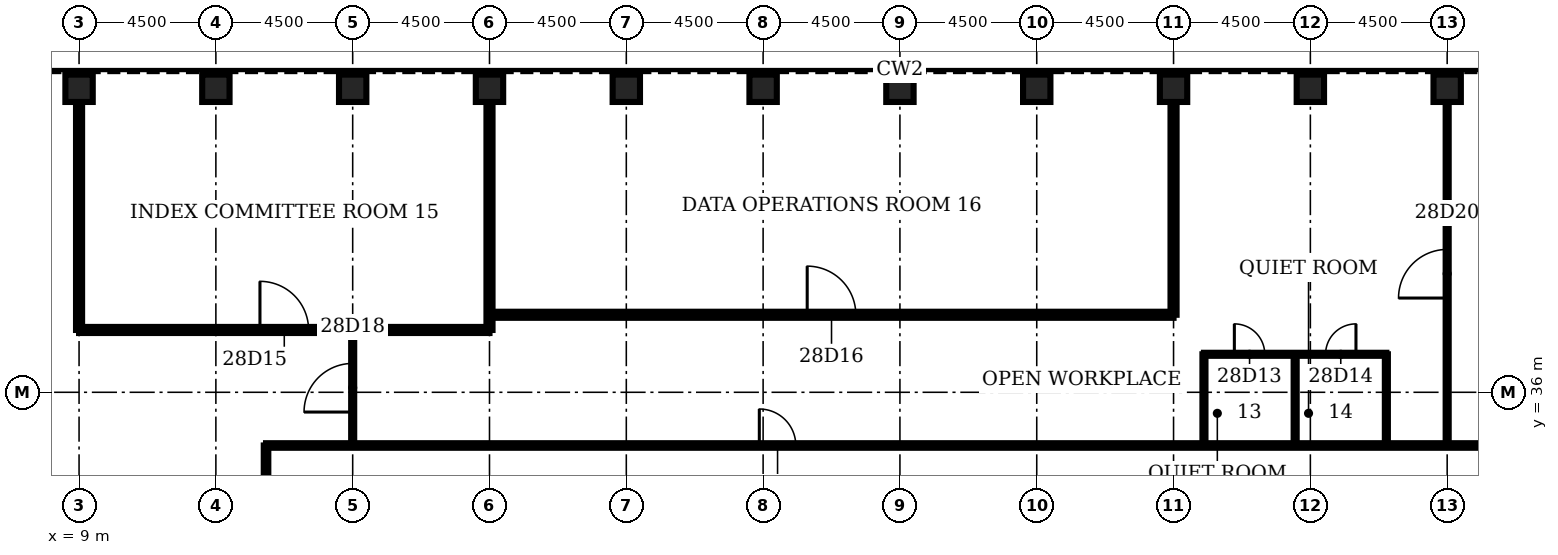
"""IFC4 building model, lengths in metres.
Left out: names, types, materials, properties, quantities, classifications, styles, units other than length and angle.
Written with IfcOpenShell. Run it as: python <this file> out.ifc"""

import sys

from ifc_helpers import new_model, si_unit, direction, frame, frame_2d, origin, origin_2d, place, context, subcontext, project, spatial, rectangle, hollow_rectangle, extrude, element, fill, save


model = new_model("IFC4")
c1 = context("Model", 3, precision=1e-05, world=origin(), true_north=direction((0.0, 1.0)))
c2 = subcontext(c1, "Body", "Model", "MODEL_VIEW")
j1 = project(units=[si_unit("LENGTHUNIT", "METRE"), si_unit("PLANEANGLEUNIT", "RADIAN")], contexts=[c1])
p1 = place(None, origin())
s1 = spatial("IfcSite", under=j1, at=p1, CompositionType="ELEMENT")
p2 = place(p1, origin())
s2 = spatial("IfcBuilding", under=s1, at=p2, CompositionType="ELEMENT")
p3 = place(p2, frame((0.0, 0.0, 129.9)))
s3 = spatial("IfcBuildingStorey", under=s2, at=p3, CompositionType="ELEMENT", Elevation=129.9)
for number, where, z_axis, x_axis in (
    (1, (54.0, 46.0, 0.0), (0.0, 0.0, 1.0), (0.0, 1.0, 0.0)),
    (2, (49.5, 46.0, 0.0), (0.0, 0.0, 1.0), (0.0, 1.0, 0.0)),
    (3, (45.0, 46.0, 0.0), (0.0, 0.0, 1.0), (0.0, 1.0, 0.0)),
    (4, (40.5, 46.0, 0.0), (0.0, 0.0, 1.0), (0.0, 1.0, 0.0)),
    (5, (36.0, 46.0, 0.0), (0.0, 0.0, 1.0), (0.0, 1.0, 0.0)),
    (6, (31.5, 46.0, 0.0), (0.0, 0.0, 1.0), (0.0, 1.0, 0.0)),
    (7, (27.0, 46.0, 0.0), (0.0, 0.0, 1.0), (0.0, 1.0, 0.0)),
    (8, (22.5, 46.0, 0.0), (0.0, 0.0, 1.0), (0.0, 1.0, 0.0)),
    (9, (18.0, 46.0, 0.0), (0.0, 0.0, 1.0), (0.0, 1.0, 0.0)),
    (10, (13.5, 46.0, 0.0), (0.0, 0.0, 1.0), (0.0, 1.0, 0.0)),
    (11, (9.0, 46.0, 0.0), (0.0, 0.0, 1.0), (0.0, 1.0, 0.0)),
):
    element("IfcColumn", number, at=place(p3, frame(where, z_axis=z_axis, x_axis=x_axis)), inside=s3, PredefinedType="COLUMN", context=c2, shape_type="SweptSolid", body=[
        extrude(hollow_rectangle(XDim=0.9, YDim=0.9, WallThickness=0.1, at=origin_2d()), origin(), (0.0, 0.0, 1.0), 4.2),
    ])
p4 = place(p3, frame((15.15, 34.25, 0.0), z_axis=(0.0, 0.0, 1.0), x_axis=(1.0, 0.0, 0.0)))
e12 = element("IfcWall", 12, at=p4, inside=s3, PredefinedType="PARTITIONING", context=c2, shape_type="SweptSolid", body=[
    extrude(rectangle(XDim=41.7, YDim=0.15, at=frame_2d((20.85, 0.0))), origin(), (0.0, 0.0, 1.0), 3.0),
])
p5 = place(p4, frame((16.225, 0.0, 0.0)))
e13 = element("IfcOpeningElement", 13, at=p5, cuts=e12, PredefinedType="OPENING", context=c2, shape_type="SweptSolid", body=[
    extrude(rectangle(XDim=1.2, YDim=2.1, at=frame_2d((0.6, 1.05))), frame((0.0, 0.085, 0.0), z_axis=(0.0, -1.0, 0.0), x_axis=(1.0, 0.0, 0.0)), (0.0, 0.0, 1.0), 0.17),
])
p6 = place(p3, frame((46.0, 37.25, 0.0), z_axis=(0.0, 0.0, 1.0), x_axis=(1.0, 0.0, 0.0)))
e14 = element("IfcWall", 14, at=p6, inside=s3, PredefinedType="PARTITIONING", context=c2, shape_type="SweptSolid", body=[
    extrude(rectangle(XDim=6.0, YDim=0.1, at=frame_2d((3.0, 0.0))), origin(), (0.0, 0.0, 1.0), 3.0),
])
p7 = place(p6, frame((1.0, 0.0, 0.0)))
e15 = element("IfcOpeningElement", 15, at=p7, cuts=e14, PredefinedType="OPENING", context=c2, shape_type="SweptSolid", body=[
    extrude(rectangle(XDim=1.0, YDim=2.1, at=frame_2d((0.5, 1.05))), frame((0.0, 0.06, 0.0), z_axis=(0.0, -1.0, 0.0), x_axis=(1.0, 0.0, 0.0)), (0.0, 0.0, 1.0), 0.12),
])
p8 = place(p6, frame((4.0, 0.0, 0.0)))
e16 = element("IfcOpeningElement", 16, at=p8, cuts=e14, PredefinedType="OPENING", context=c2, shape_type="SweptSolid", body=[
    extrude(rectangle(XDim=1.0, YDim=2.1, at=frame_2d((0.5, 1.05))), frame((0.0, 0.06, 0.0), z_axis=(0.0, -1.0, 0.0), x_axis=(1.0, 0.0, 0.0)), (0.0, 0.0, 1.0), 0.12),
])
p9 = place(p3, frame((9.0, 38.05, 0.0), z_axis=(0.0, 0.0, 1.0), x_axis=(1.0, 0.0, 0.0)))
e17 = element("IfcWall", 17, at=p9, inside=s3, PredefinedType="PARTITIONING", context=c2, shape_type="SweptSolid", body=[
    extrude(rectangle(XDim=13.5, YDim=0.2, at=frame_2d((6.75, 0.0))), origin(), (0.0, 0.0, 1.0), 3.0),
])
p10 = place(p9, frame((5.95, 0.0, 0.0)))
e18 = element("IfcOpeningElement", 18, at=p10, cuts=e17, PredefinedType="OPENING", context=c2, shape_type="SweptSolid", body=[
    extrude(rectangle(XDim=1.6, YDim=2.1, at=frame_2d((0.8, 1.05))), frame((0.0, 0.11, 0.0), z_axis=(0.0, -1.0, 0.0), x_axis=(1.0, 0.0, 0.0)), (0.0, 0.0, 1.0), 0.22),
])
p11 = place(p3, frame((22.5, 38.55, 0.0), z_axis=(0.0, 0.0, 1.0), x_axis=(1.0, 0.0, 0.0)))
e19 = element("IfcWall", 19, at=p11, inside=s3, PredefinedType="PARTITIONING", context=c2, shape_type="SweptSolid", body=[
    extrude(rectangle(XDim=22.5, YDim=0.2, at=frame_2d((11.25, 0.0))), origin(), (0.0, 0.0, 1.0), 3.0),
])
p12 = place(p11, frame((10.45, 0.0, 0.0)))
e20 = element("IfcOpeningElement", 20, at=p12, cuts=e19, PredefinedType="OPENING", context=c2, shape_type="SweptSolid", body=[
    extrude(rectangle(XDim=1.6, YDim=2.1, at=frame_2d((0.8, 1.05))), frame((0.0, 0.11, 0.0), z_axis=(0.0, -1.0, 0.0), x_axis=(1.0, 0.0, 0.0)), (0.0, 0.0, 1.0), 0.22),
])
p13 = place(p3, frame((9.0, 38.05, 0.0), z_axis=(0.0, 0.0, 1.0), x_axis=(0.0, 1.0, 0.0)))
e21 = element("IfcWall", 21, at=p13, inside=s3, PredefinedType="PARTITIONING", context=c2, shape_type="SweptSolid", body=[
    extrude(rectangle(XDim=7.5, YDim=0.2, at=frame_2d((3.75, 0.0))), origin(), (0.0, 0.0, 1.0), 3.0),
])
p14 = place(p3, frame((15.15, 13.75, 0.0), z_axis=(0.0, 0.0, 1.0), x_axis=(0.0, 1.0, 0.0)))
e22 = element("IfcWall", 22, at=p14, inside=s3, PredefinedType="PARTITIONING", context=c2, shape_type="SweptSolid", body=[
    extrude(rectangle(XDim=20.5, YDim=0.15, at=frame_2d((10.25, 0.0))), origin(), (0.0, 0.0, 1.0), 3.0),
])
p15 = place(p14, frame((9.65, 0.0, 0.0)))
e23 = element("IfcOpeningElement", 23, at=p15, cuts=e22, PredefinedType="OPENING", context=c2, shape_type="SweptSolid", body=[
    extrude(rectangle(XDim=1.2, YDim=2.1, at=frame_2d((0.6, 1.05))), frame((0.0, 0.085, 0.0), z_axis=(0.0, -1.0, 0.0), x_axis=(1.0, 0.0, 0.0)), (0.0, 0.0, 1.0), 0.17),
])
p16 = place(p3, frame((18.0, 34.25, 0.0), z_axis=(0.0, 0.0, 1.0), x_axis=(0.0, 1.0, 0.0)))
e24 = element("IfcWall", 24, at=p16, inside=s3, PredefinedType="PARTITIONING", context=c2, shape_type="SweptSolid", body=[
    extrude(rectangle(XDim=3.8, YDim=0.1, at=frame_2d((1.9, 0.0))), origin(), (0.0, 0.0, 1.0), 3.0),
])
p17 = place(p16, frame((1.1, 0.0, 0.0)))
e25 = element("IfcOpeningElement", 25, at=p17, cuts=e24, PredefinedType="OPENING", context=c2, shape_type="SweptSolid", body=[
    extrude(rectangle(XDim=1.6, YDim=2.1, at=frame_2d((0.8, 1.05))), frame((0.0, 0.06, 0.0), z_axis=(0.0, -1.0, 0.0), x_axis=(1.0, 0.0, 0.0)), (0.0, 0.0, 1.0), 0.12),
])
p18 = place(p3, frame((22.5, 38.05, 0.0), z_axis=(0.0, 0.0, 1.0), x_axis=(0.0, 1.0, 0.0)))
e26 = element("IfcWall", 26, at=p18, inside=s3, PredefinedType="PARTITIONING", context=c2, shape_type="SweptSolid", body=[
    extrude(rectangle(XDim=7.5, YDim=0.2, at=frame_2d((3.75, 0.0))), origin(), (0.0, 0.0, 1.0), 3.0),
])
p19 = place(p3, frame((45.0, 38.55, 0.0), z_axis=(0.0, 0.0, 1.0), x_axis=(0.0, 1.0, 0.0)))
e27 = element("IfcWall", 27, at=p19, inside=s3, PredefinedType="PARTITIONING", context=c2, shape_type="SweptSolid", body=[
    extrude(rectangle(XDim=7.0, YDim=0.2, at=frame_2d((3.5, 0.0))), origin(), (0.0, 0.0, 1.0), 3.0),
])
for number, where, z_axis, x_axis in (
    (28, (46.0, 34.25, 0.0), (0.0, 0.0, 1.0), (0.0, 1.0, 0.0)),
    (29, (49.0, 34.25, 0.0), (0.0, 0.0, 1.0), (0.0, 1.0, 0.0)),
    (30, (52.0, 34.25, 0.0), (0.0, 0.0, 1.0), (0.0, 1.0, 0.0)),
):
    element("IfcWall", number, at=place(p3, frame(where, z_axis=z_axis, x_axis=x_axis)), inside=s3, PredefinedType="PARTITIONING", context=c2, shape_type="SweptSolid", body=[
        extrude(rectangle(XDim=3.0, YDim=0.1, at=frame_2d((1.5, 0.0))), origin(), (0.0, 0.0, 1.0), 3.0),
    ])
p20 = place(p3, frame((54.0, 34.25, 0.0), z_axis=(0.0, 0.0, 1.0), x_axis=(0.0, 1.0, 0.0)))
e31 = element("IfcWall", 31, at=p20, inside=s3, PredefinedType="PARTITIONING", context=c2, shape_type="SweptSolid", body=[
    extrude(rectangle(XDim=11.3, YDim=0.1, at=frame_2d((5.65, 0.0))), origin(), (0.0, 0.0, 1.0), 3.0),
])
p21 = place(p20, frame((4.85, 0.0, 0.0)))
e32 = element("IfcOpeningElement", 32, at=p21, cuts=e31, PredefinedType="OPENING", context=c2, shape_type="SweptSolid", body=[
    extrude(rectangle(XDim=1.6, YDim=2.1, at=frame_2d((0.8, 1.05))), frame((0.0, 0.06, 0.0), z_axis=(0.0, -1.0, 0.0), x_axis=(1.0, 0.0, 0.0)), (0.0, 0.0, 1.0), 0.12),
])
p22 = place(p7, origin())
e33 = element("IfcDoor", 33, at=p22, inside=s3, OperationType="SINGLE_SWING_LEFT", PredefinedType="DOOR", context=c2, shape_type="SweptSolid", body=[
    extrude(rectangle(XDim=1.0, YDim=2.1, at=frame_2d((0.5, 1.05))), frame((0.0, 0.025, 0.0), z_axis=(0.0, -1.0, 0.0), x_axis=(1.0, 0.0, 0.0)), (0.0, 0.0, 1.0), 0.05),
])
fill(e15, e33)
p23 = place(p8, origin())
e34 = element("IfcDoor", 34, at=p23, inside=s3, OperationType="SINGLE_SWING_RIGHT", PredefinedType="DOOR", context=c2, shape_type="SweptSolid", body=[
    extrude(rectangle(XDim=1.0, YDim=2.1, at=frame_2d((0.5, 1.05))), frame((0.0, 0.025, 0.0), z_axis=(0.0, -1.0, 0.0), x_axis=(1.0, 0.0, 0.0)), (0.0, 0.0, 1.0), 0.05),
])
fill(e16, e34)
p24 = place(p10, origin())
e35 = element("IfcDoor", 35, at=p24, inside=s3, OperationType="SINGLE_SWING_LEFT", PredefinedType="DOOR", context=c2, shape_type="SweptSolid", body=[
    extrude(rectangle(XDim=1.6, YDim=2.1, at=frame_2d((0.8, 1.05))), frame((0.0, 0.025, 0.0), z_axis=(0.0, -1.0, 0.0), x_axis=(1.0, 0.0, 0.0)), (0.0, 0.0, 1.0), 0.05),
])
fill(e18, e35)
p25 = place(p12, origin())
e36 = element("IfcDoor", 36, at=p25, inside=s3, OperationType="SINGLE_SWING_LEFT", PredefinedType="DOOR", context=c2, shape_type="SweptSolid", body=[
    extrude(rectangle(XDim=1.6, YDim=2.1, at=frame_2d((0.8, 1.05))), frame((0.0, 0.025, 0.0), z_axis=(0.0, -1.0, 0.0), x_axis=(1.0, 0.0, 0.0)), (0.0, 0.0, 1.0), 0.05),
])
fill(e20, e36)
p26 = place(p17, origin())
e37 = element("IfcDoor", 37, at=p26, inside=s3, OperationType="SINGLE_SWING_LEFT", PredefinedType="DOOR", context=c2, shape_type="SweptSolid", body=[
    extrude(rectangle(XDim=1.6, YDim=2.1, at=frame_2d((0.8, 1.05))), frame((0.0, 0.025, 0.0), z_axis=(0.0, -1.0, 0.0), x_axis=(1.0, 0.0, 0.0)), (0.0, 0.0, 1.0), 0.05),
])
fill(e25, e37)
p27 = place(p21, origin())
e38 = element("IfcDoor", 38, at=p27, inside=s3, OperationType="SINGLE_SWING_LEFT", PredefinedType="DOOR", context=c2, shape_type="SweptSolid", body=[
    extrude(rectangle(XDim=1.6, YDim=2.1, at=frame_2d((0.8, 1.05))), frame((0.0, 0.025, 0.0), z_axis=(0.0, -1.0, 0.0), x_axis=(1.0, 0.0, 0.0)), (0.0, 0.0, 1.0), 0.05),
])
fill(e32, e38)
p28 = place(p5, origin())
e39 = element("IfcDoor", 39, at=p28, inside=s3, OperationType="SINGLE_SWING_LEFT", PredefinedType="DOOR", context=c2, shape_type="SweptSolid", body=[
    extrude(rectangle(XDim=1.2, YDim=2.1, at=frame_2d((0.6, 1.05))), frame((0.0, 0.025, 0.0), z_axis=(0.0, -1.0, 0.0), x_axis=(1.0, 0.0, 0.0)), (0.0, 0.0, 1.0), 0.05),
])
fill(e13, e39)
save(model, sys.argv[1])
